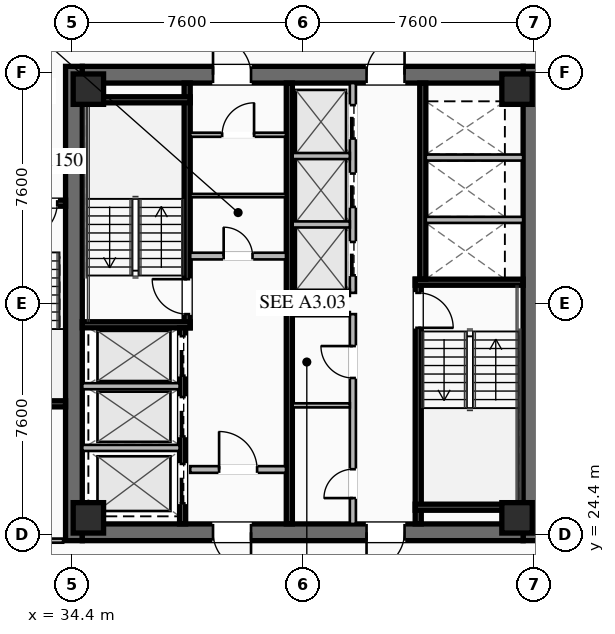
"""IFC4 building model, lengths in metres.
Left out: names, types, materials, properties, quantities, classifications, styles, units other than length and angle.
Written with IfcOpenShell. Run it as: python <this file> out.ifc"""

import sys

from ifc_helpers import new_model, si_unit, direction, frame, frame_2d, origin, origin_2d, place, context, subcontext, project, spatial, rectangle, hollow_rectangle, extrude, element, fill, save


model = new_model("IFC4")
c1 = context("Model", 3, precision=1e-05, world=origin(), true_north=direction((0.0, 1.0)))
c2 = subcontext(c1, "Body", "Model", "MODEL_VIEW")
j1 = project(units=[si_unit("LENGTHUNIT", "METRE"), si_unit("PLANEANGLEUNIT", "RADIAN")], contexts=[c1])
p1 = place(None, origin())
s1 = spatial("IfcSite", under=j1, at=p1, CompositionType="ELEMENT")
p2 = place(p1, origin())
s2 = spatial("IfcBuilding", under=s1, at=p2, CompositionType="ELEMENT")
p3 = place(p2, frame((0.0, 0.0, 142.8)))
s3 = spatial("IfcBuildingStorey", under=s2, at=p3, CompositionType="ELEMENT", Elevation=142.8)
for number, where, z_axis, x_axis in (
    (1, (34.475, 24.2, 0.0), (0.0, 0.0, 1.0), (0.0, 1.0, 0.0)),
    (2, (49.525, 39.8, 0.0), (0.0, 0.0, 1.0), (0.0, -1.0, 0.0)),
):
    element("IfcWall", number, at=place(p3, frame(where, z_axis=z_axis, x_axis=x_axis)), inside=s3, PredefinedType="SHEAR", context=c2, shape_type="SweptSolid", body=[
        extrude(rectangle(XDim=15.6, YDim=0.55, at=frame_2d((7.8, 0.0))), origin(), (0.0, 0.0, 1.0), 3.55),
    ])
p4 = place(p3, frame((49.25, 24.475, 0.0), z_axis=(0.0, 0.0, 1.0), x_axis=(-1.0, 0.0, 0.0)))
e3 = element("IfcWall", 3, at=p4, inside=s3, PredefinedType="SHEAR", context=c2, shape_type="SweptSolid", body=[
    extrude(rectangle(XDim=14.5, YDim=0.55, at=frame_2d((7.25, 0.0))), origin(), (0.0, 0.0, 1.0), 3.55),
])
p5 = place(p4, frame((8.95, 0.0, 0.0)))
e4 = element("IfcOpeningElement", 4, at=p5, cuts=e3, PredefinedType="OPENING", context=c2, shape_type="SweptSolid", body=[
    extrude(rectangle(XDim=1.25, YDim=2.25, at=frame_2d((0.625, 1.125))), frame((0.0, 0.285, 0.0), z_axis=(0.0, -1.0, 0.0), x_axis=(1.0, 0.0, 0.0)), (0.0, 0.0, 1.0), 0.57),
])
p6 = place(p4, frame((3.9, 0.0, 0.0)))
e5 = element("IfcOpeningElement", 5, at=p6, cuts=e3, PredefinedType="OPENING", context=c2, shape_type="SweptSolid", body=[
    extrude(rectangle(XDim=1.25, YDim=2.25, at=frame_2d((0.625, 1.125))), frame((0.0, 0.285, 0.0), z_axis=(0.0, -1.0, 0.0), x_axis=(1.0, 0.0, 0.0)), (0.0, 0.0, 1.0), 0.57),
])
p7 = place(p3, frame((34.75, 39.525, 0.0), z_axis=(0.0, 0.0, 1.0), x_axis=(1.0, 0.0, 0.0)))
e6 = element("IfcWall", 6, at=p7, inside=s3, PredefinedType="SHEAR", context=c2, shape_type="SweptSolid", body=[
    extrude(rectangle(XDim=14.5, YDim=0.55, at=frame_2d((7.25, 0.0))), origin(), (0.0, 0.0, 1.0), 3.55),
])
p8 = place(p7, frame((4.3, 0.0, 0.0)))
e7 = element("IfcOpeningElement", 7, at=p8, cuts=e6, PredefinedType="OPENING", context=c2, shape_type="SweptSolid", body=[
    extrude(rectangle(XDim=1.25, YDim=2.25, at=frame_2d((0.625, 1.125))), frame((0.0, 0.285, 0.0), z_axis=(0.0, -1.0, 0.0), x_axis=(1.0, 0.0, 0.0)), (0.0, 0.0, 1.0), 0.57),
])
p9 = place(p7, frame((9.35, 0.0, 0.0)))
e8 = element("IfcOpeningElement", 8, at=p9, cuts=e6, PredefinedType="OPENING", context=c2, shape_type="SweptSolid", body=[
    extrude(rectangle(XDim=1.25, YDim=2.25, at=frame_2d((0.625, 1.125))), frame((0.0, 0.285, 0.0), z_axis=(0.0, -1.0, 0.0), x_axis=(1.0, 0.0, 0.0)), (0.0, 0.0, 1.0), 0.57),
])
for number, where, z_axis, x_axis in (
    (9, (34.95, 24.95, 0.0), (0.0, 0.0, 1.0), (1.0, 0.0, 0.0)),
    (10, (49.05, 24.95, 0.0), (0.0, 0.0, 1.0), (1.0, 0.0, 0.0)),
    (11, (49.05, 39.05, 0.0), (0.0, 0.0, 1.0), (1.0, 0.0, 0.0)),
    (12, (34.95, 39.05, 0.0), (0.0, 0.0, 1.0), (1.0, 0.0, 0.0)),
):
    element("IfcColumn", number, at=place(p3, frame(where, z_axis=z_axis, x_axis=x_axis)), inside=s3, PredefinedType="COLUMN", context=c2, shape_type="SweptSolid", body=[
        extrude(hollow_rectangle(XDim=1.0, YDim=1.0, WallThickness=0.04, at=origin_2d()), origin(), (0.0, 0.0, 1.0), 3.37),
    ])
p10 = place(p3, frame((38.2, 31.2, 0.0), z_axis=(0.0, 0.0, 1.0), x_axis=(0.0, 1.0, 0.0)))
e13 = element("IfcWall", 13, at=p10, inside=s3, PredefinedType="SHEAR", context=c2, shape_type="SweptSolid", body=[
    extrude(rectangle(XDim=8.05, YDim=0.2, at=frame_2d((4.025, 0.0))), origin(), (0.0, 0.0, 1.0), 3.37),
])
p11 = place(p10, frame((0.45, 0.0, 0.0)))
e14 = element("IfcOpeningElement", 14, at=p11, cuts=e13, PredefinedType="OPENING", context=c2, shape_type="SweptSolid", body=[
    extrude(rectangle(XDim=1.15, YDim=2.2, at=frame_2d((0.575, 1.1))), frame((0.0, 0.11, 0.0), z_axis=(0.0, -1.0, 0.0), x_axis=(1.0, 0.0, 0.0)), (0.0, 0.0, 1.0), 0.22),
])
for number, where, z_axis, x_axis in (
    (15, (34.75, 31.3, 0.0), (0.0, 0.0, 1.0), (1.0, 0.0, 0.0)),
    (16, (34.75, 38.7, 0.0), (0.0, 0.0, 1.0), (1.0, 0.0, 0.0)),
):
    element("IfcWall", number, at=place(p3, frame(where, z_axis=z_axis, x_axis=x_axis)), inside=s3, PredefinedType="SHEAR", context=c2, shape_type="SweptSolid", body=[
        extrude(rectangle(XDim=3.55, YDim=0.2, at=frame_2d((1.775, 0.0))), origin(), (0.0, 0.0, 1.0), 3.37),
    ])
p12 = place(p3, frame((45.8, 32.8, 0.0), z_axis=(0.0, 0.0, 1.0), x_axis=(0.0, -1.0, 0.0)))
e17 = element("IfcWall", 17, at=p12, inside=s3, PredefinedType="SHEAR", context=c2, shape_type="SweptSolid", body=[
    extrude(rectangle(XDim=8.05, YDim=0.2, at=frame_2d((4.025, 0.0))), origin(), (0.0, 0.0, 1.0), 3.37),
])
p13 = place(p12, frame((0.45, 0.0, 0.0)))
e18 = element("IfcOpeningElement", 18, at=p13, cuts=e17, PredefinedType="OPENING", context=c2, shape_type="SweptSolid", body=[
    extrude(rectangle(XDim=1.15, YDim=2.2, at=frame_2d((0.575, 1.1))), frame((0.0, 0.11, 0.0), z_axis=(0.0, -1.0, 0.0), x_axis=(1.0, 0.0, 0.0)), (0.0, 0.0, 1.0), 0.22),
])
for number, where, z_axis, x_axis in (
    (19, (45.7, 32.7, 0.0), (0.0, 0.0, 1.0), (1.0, 0.0, 0.0)),
    (20, (45.7, 25.3, 0.0), (0.0, 0.0, 1.0), (1.0, 0.0, 0.0)),
):
    element("IfcWall", number, at=place(p3, frame(where, z_axis=z_axis, x_axis=x_axis)), inside=s3, PredefinedType="SHEAR", context=c2, shape_type="SweptSolid", body=[
        extrude(rectangle(XDim=3.55, YDim=0.2, at=frame_2d((1.775, 0.0))), origin(), (0.0, 0.0, 1.0), 3.37),
    ])
p14 = place(p3, frame((41.56, 24.75, 0.0), z_axis=(0.0, 0.0, 1.0), x_axis=(0.0, 1.0, 0.0)))
e21 = element("IfcWall", 21, at=p14, inside=s3, PredefinedType="SHEAR", context=c2, shape_type="SweptSolid", body=[
    extrude(rectangle(XDim=14.5, YDim=0.2, at=frame_2d((7.25, 0.0))), origin(), (0.0, 0.0, 1.0), 3.37),
])
p15 = place(p3, frame((38.3, 33.56, 0.0), z_axis=(0.0, 0.0, 1.0), x_axis=(1.0, 0.0, 0.0)))
e22 = element("IfcWall", 22, at=p15, inside=s3, PredefinedType="SOLIDWALL", context=c2, shape_type="SweptSolid", body=[
    extrude(rectangle(XDim=3.15, YDim=0.22, at=frame_2d((1.575, 0.0))), origin(), (0.0, 0.0, 1.0), 2.723),
])
p16 = place(p15, frame((1.1, 0.0, 0.0)))
e23 = element("IfcOpeningElement", 23, at=p16, cuts=e22, PredefinedType="OPENING", context=c2, shape_type="SweptSolid", body=[
    extrude(rectangle(XDim=0.95, YDim=2.05, at=frame_2d((0.475, 1.025))), frame((0.0, 0.12, 0.0), z_axis=(0.0, -1.0, 0.0), x_axis=(1.0, 0.0, 0.0)), (0.0, 0.0, 1.0), 0.24),
])
p17 = place(p3, frame((38.3, 26.54, 0.0), z_axis=(0.0, 0.0, 1.0), x_axis=(1.0, 0.0, 0.0)))
e24 = element("IfcWall", 24, at=p17, inside=s3, PredefinedType="SOLIDWALL", context=c2, shape_type="SweptSolid", body=[
    extrude(rectangle(XDim=3.15, YDim=0.22, at=frame_2d((1.575, 0.0))), origin(), (0.0, 0.0, 1.0), 2.723),
])
p18 = place(p17, frame((0.95, 0.0, 0.0)))
e25 = element("IfcOpeningElement", 25, at=p18, cuts=e24, PredefinedType="OPENING", context=c2, shape_type="SweptSolid", body=[
    extrude(rectangle(XDim=1.25, YDim=2.25, at=frame_2d((0.625, 1.125))), frame((0.0, 0.12, 0.0), z_axis=(0.0, -1.0, 0.0), x_axis=(1.0, 0.0, 0.0)), (0.0, 0.0, 1.0), 0.24),
])
p19 = place(p3, frame((38.05, 24.75, 0.0), z_axis=(0.0, 0.0, 1.0), x_axis=(0.0, 1.0, 0.0)))
e26 = element("IfcWall", 26, at=p19, inside=s3, PredefinedType="SHEAR", context=c2, shape_type="SweptSolid", body=[
    extrude(rectangle(XDim=6.45, YDim=0.2, at=frame_2d((3.225, 0.0))), origin(), (0.0, 0.0, 1.0), 3.37),
])
p20 = place(p19, frame((4.875, 0.0, 0.0)))
e27 = element("IfcOpeningElement", 27, at=p20, cuts=e26, PredefinedType="OPENING", context=c2, shape_type="SweptSolid", body=[
    extrude(rectangle(XDim=1.3, YDim=2.25, at=frame_2d((0.65, 1.125))), frame((0.0, 0.11, 0.0), z_axis=(0.0, -1.0, 0.0), x_axis=(1.0, 0.0, 0.0)), (0.0, 0.0, 1.0), 0.22),
])
p21 = place(p19, frame((2.875, 0.0, 0.0)))
e28 = element("IfcOpeningElement", 28, at=p21, cuts=e26, PredefinedType="OPENING", context=c2, shape_type="SweptSolid", body=[
    extrude(rectangle(XDim=1.3, YDim=2.25, at=frame_2d((0.65, 1.125))), frame((0.0, 0.11, 0.0), z_axis=(0.0, -1.0, 0.0), x_axis=(1.0, 0.0, 0.0)), (0.0, 0.0, 1.0), 0.22),
])
p22 = place(p19, frame((0.675, 0.0, 0.0)))
e29 = element("IfcOpeningElement", 29, at=p22, cuts=e26, PredefinedType="OPENING", context=c2, shape_type="SweptSolid", body=[
    extrude(rectangle(XDim=1.3, YDim=2.25, at=frame_2d((0.65, 1.125))), frame((0.0, 0.11, 0.0), z_axis=(0.0, -1.0, 0.0), x_axis=(1.0, 0.0, 0.0)), (0.0, 0.0, 1.0), 0.22),
])
for number, where, z_axis, x_axis in (
    (30, (34.75, 27.25, 0.0), (0.0, 0.0, 1.0), (1.0, 0.0, 0.0)),
    (31, (34.75, 29.28, 0.0), (0.0, 0.0, 1.0), (1.0, 0.0, 0.0)),
):
    element("IfcWall", number, at=place(p3, frame(where, z_axis=z_axis, x_axis=x_axis)), inside=s3, PredefinedType="SOLIDWALL", context=c2, shape_type="SweptSolid", body=[
        extrude(rectangle(XDim=3.2, YDim=0.2, at=frame_2d((1.6, 0.0))), origin(), (0.0, 0.0, 1.0), 3.37),
    ])
p23 = place(p3, frame((45.95, 39.25, 0.0), z_axis=(0.0, 0.0, 1.0), x_axis=(0.0, -1.0, 0.0)))
e32 = element("IfcWall", 32, at=p23, inside=s3, PredefinedType="SHEAR", context=c2, shape_type="SweptSolid", body=[
    extrude(rectangle(XDim=6.45, YDim=0.2, at=frame_2d((3.225, 0.0))), origin(), (0.0, 0.0, 1.0), 3.37),
])
for number, where, z_axis, x_axis in (
    (33, (46.05, 34.75, 0.0), (0.0, 0.0, 1.0), (1.0, 0.0, 0.0)),
    (34, (46.05, 36.8, 0.0), (0.0, 0.0, 1.0), (1.0, 0.0, 0.0)),
):
    element("IfcWall", number, at=place(p3, frame(where, z_axis=z_axis, x_axis=x_axis)), inside=s3, PredefinedType="SOLIDWALL", context=c2, shape_type="SweptSolid", body=[
        extrude(rectangle(XDim=3.2, YDim=0.2, at=frame_2d((1.6, 0.0))), origin(), (0.0, 0.0, 1.0), 3.37),
    ])
p24 = place(p3, frame((38.3, 37.55, 0.0), z_axis=(0.0, 0.0, 1.0), x_axis=(1.0, 0.0, 0.0)))
e35 = element("IfcWall", 35, at=p24, inside=s3, PredefinedType="PARTITIONING", context=c2, shape_type="SweptSolid", body=[
    extrude(rectangle(XDim=3.15, YDim=0.135, at=frame_2d((1.575, 0.0))), origin(), (0.0, 0.0, 1.0), 2.723),
])
p25 = place(p24, frame((1.05, 0.0, 0.0)))
e36 = element("IfcOpeningElement", 36, at=p25, cuts=e35, PredefinedType="OPENING", context=c2, shape_type="SweptSolid", body=[
    extrude(rectangle(XDim=1.05, YDim=2.2, at=frame_2d((0.525, 1.1))), frame((0.0, 0.077, 0.0), z_axis=(0.0, -1.0, 0.0), x_axis=(1.0, 0.0, 0.0)), (0.0, 0.0, 1.0), 0.155),
])
p26 = place(p3, frame((38.3, 35.55, 0.0), z_axis=(0.0, 0.0, 1.0), x_axis=(1.0, 0.0, 0.0)))
e37 = element("IfcWall", 37, at=p26, inside=s3, PredefinedType="PARTITIONING", context=c2, shape_type="SweptSolid", body=[
    extrude(rectangle(XDim=3.15, YDim=0.11, at=frame_2d((1.575, 0.0))), origin(), (0.0, 0.0, 1.0), 2.723),
])
p27 = place(p3, frame((43.65, 24.75, 0.0), z_axis=(0.0, 0.0, 1.0), x_axis=(0.0, 1.0, 0.0)))
e38 = element("IfcWall", 38, at=p27, inside=s3, PredefinedType="SOLIDWALL", context=c2, shape_type="SweptSolid", body=[
    extrude(rectangle(XDim=6.9, YDim=0.2, at=frame_2d((3.45, 0.0))), origin(), (0.0, 0.0, 1.0), 2.723),
])
p28 = place(p27, frame((0.85, 0.0, 0.0)))
e39 = element("IfcOpeningElement", 39, at=p28, cuts=e38, PredefinedType="OPENING", context=c2, shape_type="SweptSolid", body=[
    extrude(rectangle(XDim=0.95, YDim=2.05, at=frame_2d((0.475, 1.025))), frame((0.0, 0.11, 0.0), z_axis=(0.0, -1.0, 0.0), x_axis=(1.0, 0.0, 0.0)), (0.0, 0.0, 1.0), 0.22),
])
p29 = place(p27, frame((4.8, 0.0, 0.0)))
e40 = element("IfcOpeningElement", 40, at=p29, cuts=e38, PredefinedType="OPENING", context=c2, shape_type="SweptSolid", body=[
    extrude(rectangle(XDim=1.05, YDim=2.2, at=frame_2d((0.525, 1.1))), frame((0.0, 0.11, 0.0), z_axis=(0.0, -1.0, 0.0), x_axis=(1.0, 0.0, 0.0)), (0.0, 0.0, 1.0), 0.22),
])
for number, where, z_axis, x_axis in (
    (41, (41.67, 31.65, 0.0), (0.0, 0.0, 1.0), (1.0, 0.0, 0.0)),
    (42, (41.67, 28.65, 0.0), (0.0, 0.0, 1.0), (1.0, 0.0, 0.0)),
):
    element("IfcWall", number, at=place(p3, frame(where, z_axis=z_axis, x_axis=x_axis)), inside=s3, PredefinedType="PARTITIONING", context=c2, shape_type="SweptSolid", body=[
        extrude(rectangle(XDim=1.88, YDim=0.135, at=frame_2d((0.94, 0.0))), origin(), (0.0, 0.0, 1.0), 2.723),
    ])
p30 = place(p3, frame((43.65, 32.35, 0.0), z_axis=(0.0, 0.0, 1.0), x_axis=(0.0, 1.0, 0.0)))
e43 = element("IfcWall", 43, at=p30, inside=s3, PredefinedType="SOLIDWALL", context=c2, shape_type="SweptSolid", body=[
    extrude(rectangle(XDim=6.9, YDim=0.2, at=frame_2d((3.45, 0.0))), origin(), (0.0, 0.0, 1.0), 3.37),
])
p31 = place(p30, frame((0.575, 0.0, 0.0)))
e44 = element("IfcOpeningElement", 44, at=p31, cuts=e43, PredefinedType="OPENING", context=c2, shape_type="SweptSolid", body=[
    extrude(rectangle(XDim=1.1, YDim=2.2, at=frame_2d((0.55, 1.1))), frame((0.0, 0.11, 0.0), z_axis=(0.0, -1.0, 0.0), x_axis=(1.0, 0.0, 0.0)), (0.0, 0.0, 1.0), 0.22),
])
p32 = place(p30, frame((2.825, 0.0, 0.0)))
e45 = element("IfcOpeningElement", 45, at=p32, cuts=e43, PredefinedType="OPENING", context=c2, shape_type="SweptSolid", body=[
    extrude(rectangle(XDim=1.1, YDim=2.2, at=frame_2d((0.55, 1.1))), frame((0.0, 0.11, 0.0), z_axis=(0.0, -1.0, 0.0), x_axis=(1.0, 0.0, 0.0)), (0.0, 0.0, 1.0), 0.22),
])
p33 = place(p30, frame((5.075, 0.0, 0.0)))
e46 = element("IfcOpeningElement", 46, at=p33, cuts=e43, PredefinedType="OPENING", context=c2, shape_type="SweptSolid", body=[
    extrude(rectangle(XDim=1.1, YDim=2.2, at=frame_2d((0.55, 1.1))), frame((0.0, 0.11, 0.0), z_axis=(0.0, -1.0, 0.0), x_axis=(1.0, 0.0, 0.0)), (0.0, 0.0, 1.0), 0.22),
])
for number, where, z_axis, x_axis in (
    (47, (41.67, 32.35, 0.0), (0.0, 0.0, 1.0), (1.0, 0.0, 0.0)),
    (48, (41.67, 34.6, 0.0), (0.0, 0.0, 1.0), (1.0, 0.0, 0.0)),
    (49, (41.67, 36.85, 0.0), (0.0, 0.0, 1.0), (1.0, 0.0, 0.0)),
):
    element("IfcWall", number, at=place(p3, frame(where, z_axis=z_axis, x_axis=x_axis)), inside=s3, PredefinedType="SOLIDWALL", context=c2, shape_type="SweptSolid", body=[
        extrude(rectangle(XDim=1.88, YDim=0.2, at=frame_2d((0.94, 0.0))), origin(), (0.0, 0.0, 1.0), 3.37),
    ])
p34 = place(p3, frame((34.2, 35.3, 0.0), z_axis=(0.0, 0.0, 1.0), x_axis=(-1.0, 0.0, 0.0)))
e50 = element("IfcWall", 50, at=p34, inside=s3, PredefinedType="SHEAR", context=c2, shape_type="SweptSolid", body=[
    extrude(rectangle(XDim=3.4, YDim=0.2, at=frame_2d((1.7, 0.0))), origin(), (0.0, 0.0, 1.0), 3.37),
])
p35 = place(p34, frame((0.275, 0.0, 0.0)))
e51 = element("IfcOpeningElement", 51, at=p35, cuts=e50, PredefinedType="OPENING", context=c2, shape_type="SweptSolid", body=[
    extrude(rectangle(XDim=1.15, YDim=2.2, at=frame_2d((0.575, 1.1))), frame((0.0, 0.11, 0.0), z_axis=(0.0, -1.0, 0.0), x_axis=(1.0, 0.0, 0.0)), (0.0, 0.0, 1.0), 0.22),
])
p36 = place(p3, frame((30.8, 28.7, 0.0), z_axis=(0.0, 0.0, 1.0), x_axis=(1.0, 0.0, 0.0)))
e52 = element("IfcWall", 52, at=p36, inside=s3, PredefinedType="SHEAR", context=c2, shape_type="SweptSolid", body=[
    extrude(rectangle(XDim=3.4, YDim=0.2, at=frame_2d((1.7, 0.0))), origin(), (0.0, 0.0, 1.0), 3.37),
])
p37 = place(p3, frame((22.72, 24.2, 0.0), z_axis=(0.0, 0.0, 1.0), x_axis=(1.0, 0.0, 0.0)))
e53 = element("IfcWall", 53, at=p37, inside=s3, PredefinedType="PARTITIONING", context=c2, shape_type="SweptSolid", body=[
    extrude(rectangle(XDim=11.4, YDim=0.135, at=frame_2d((5.7, 0.0))), origin(), (0.0, 0.0, 1.0), 2.723),
])
p38 = place(p37, frame((8.405, 0.0, 0.0)))
e54 = element("IfcOpeningElement", 54, at=p38, cuts=e53, PredefinedType="OPENING", context=c2, shape_type="SweptSolid", body=[
    extrude(rectangle(XDim=0.95, YDim=2.05, at=frame_2d((0.475, 1.025))), frame((0.0, 0.077, 0.0), z_axis=(0.0, -1.0, 0.0), x_axis=(1.0, 0.0, 0.0)), (0.0, 0.0, 1.0), 0.155),
])
p39 = place(p8, origin())
e55 = element("IfcDoor", 55, at=p39, inside=s3, OperationType="SINGLE_SWING_LEFT", PredefinedType="DOOR", context=c2, shape_type="SweptSolid", body=[
    extrude(rectangle(XDim=1.25, YDim=2.25, at=frame_2d((0.625, 1.125))), frame((0.0, 0.025, 0.0), z_axis=(0.0, -1.0, 0.0), x_axis=(1.0, 0.0, 0.0)), (0.0, 0.0, 1.0), 0.05),
])
fill(e7, e55)
p40 = place(p9, origin())
e56 = element("IfcDoor", 56, at=p40, inside=s3, OperationType="SINGLE_SWING_RIGHT", PredefinedType="DOOR", context=c2, shape_type="SweptSolid", body=[
    extrude(rectangle(XDim=1.25, YDim=2.25, at=frame_2d((0.625, 1.125))), frame((0.0, 0.025, 0.0), z_axis=(0.0, -1.0, 0.0), x_axis=(1.0, 0.0, 0.0)), (0.0, 0.0, 1.0), 0.05),
])
fill(e8, e56)
p41 = place(p5, origin())
e57 = element("IfcDoor", 57, at=p41, inside=s3, OperationType="SINGLE_SWING_LEFT", PredefinedType="DOOR", context=c2, shape_type="SweptSolid", body=[
    extrude(rectangle(XDim=1.25, YDim=2.25, at=frame_2d((0.625, 1.125))), frame((0.0, 0.025, 0.0), z_axis=(0.0, -1.0, 0.0), x_axis=(1.0, 0.0, 0.0)), (0.0, 0.0, 1.0), 0.05),
])
fill(e4, e57)
p42 = place(p6, origin())
e58 = element("IfcDoor", 58, at=p42, inside=s3, OperationType="SINGLE_SWING_RIGHT", PredefinedType="DOOR", context=c2, shape_type="SweptSolid", body=[
    extrude(rectangle(XDim=1.25, YDim=2.25, at=frame_2d((0.625, 1.125))), frame((0.0, 0.025, 0.0), z_axis=(0.0, -1.0, 0.0), x_axis=(1.0, 0.0, 0.0)), (0.0, 0.0, 1.0), 0.05),
])
fill(e5, e58)
p43 = place(p11, origin())
e59 = element("IfcDoor", 59, at=p43, inside=s3, OperationType="SINGLE_SWING_RIGHT", PredefinedType="DOOR", context=c2, shape_type="SweptSolid", body=[
    extrude(rectangle(XDim=1.15, YDim=2.2, at=frame_2d((0.575, 1.1))), frame((0.0, 0.025, 0.0), z_axis=(0.0, -1.0, 0.0), x_axis=(1.0, 0.0, 0.0)), (0.0, 0.0, 1.0), 0.05),
])
fill(e14, e59)
p44 = place(p13, origin())
e60 = element("IfcDoor", 60, at=p44, inside=s3, OperationType="SINGLE_SWING_RIGHT", PredefinedType="DOOR", context=c2, shape_type="SweptSolid", body=[
    extrude(rectangle(XDim=1.15, YDim=2.2, at=frame_2d((0.575, 1.1))), frame((0.0, 0.025, 0.0), z_axis=(0.0, -1.0, 0.0), x_axis=(1.0, 0.0, 0.0)), (0.0, 0.0, 1.0), 0.05),
])
fill(e18, e60)
p45 = place(p18, origin())
e61 = element("IfcDoor", 61, at=p45, inside=s3, OperationType="SINGLE_SWING_LEFT", PredefinedType="DOOR", context=c2, shape_type="SweptSolid", body=[
    extrude(rectangle(XDim=1.25, YDim=2.25, at=frame_2d((0.625, 1.125))), frame((0.0, 0.025, 0.0), z_axis=(0.0, -1.0, 0.0), x_axis=(1.0, 0.0, 0.0)), (0.0, 0.0, 1.0), 0.05),
])
fill(e25, e61)
p46 = place(p25, origin())
e62 = element("IfcDoor", 62, at=p46, inside=s3, OperationType="SINGLE_SWING_RIGHT", PredefinedType="DOOR", context=c2, shape_type="SweptSolid", body=[
    extrude(rectangle(XDim=1.05, YDim=2.2, at=frame_2d((0.525, 1.1))), frame((0.0, 0.025, 0.0), z_axis=(0.0, -1.0, 0.0), x_axis=(1.0, 0.0, 0.0)), (0.0, 0.0, 1.0), 0.05),
])
fill(e36, e62)
p47 = place(p16, origin())
e63 = element("IfcDoor", 63, at=p47, inside=s3, OperationType="SINGLE_SWING_LEFT", PredefinedType="DOOR", context=c2, shape_type="SweptSolid", body=[
    extrude(rectangle(XDim=0.95, YDim=2.05, at=frame_2d((0.475, 1.025))), frame((0.0, 0.025, 0.0), z_axis=(0.0, -1.0, 0.0), x_axis=(1.0, 0.0, 0.0)), (0.0, 0.0, 1.0), 0.05),
])
fill(e23, e63)
p48 = place(p28, origin())
e64 = element("IfcDoor", 64, at=p48, inside=s3, OperationType="SINGLE_SWING_LEFT", PredefinedType="DOOR", context=c2, shape_type="SweptSolid", body=[
    extrude(rectangle(XDim=0.95, YDim=2.05, at=frame_2d((0.475, 1.025))), frame((0.0, 0.025, 0.0), z_axis=(0.0, -1.0, 0.0), x_axis=(1.0, 0.0, 0.0)), (0.0, 0.0, 1.0), 0.05),
])
fill(e39, e64)
p49 = place(p29, origin())
e65 = element("IfcDoor", 65, at=p49, inside=s3, OperationType="SINGLE_SWING_RIGHT", PredefinedType="DOOR", context=c2, shape_type="SweptSolid", body=[
    extrude(rectangle(XDim=1.05, YDim=2.2, at=frame_2d((0.525, 1.1))), frame((0.0, 0.025, 0.0), z_axis=(0.0, -1.0, 0.0), x_axis=(1.0, 0.0, 0.0)), (0.0, 0.0, 1.0), 0.05),
])
fill(e40, e65)
p50 = place(p35, origin())
e66 = element("IfcDoor", 66, at=p50, inside=s3, OperationType="SINGLE_SWING_RIGHT", PredefinedType="DOOR", context=c2, shape_type="SweptSolid", body=[
    extrude(rectangle(XDim=1.15, YDim=2.2, at=frame_2d((0.575, 1.1))), frame((0.0, 0.025, 0.0), z_axis=(0.0, -1.0, 0.0), x_axis=(1.0, 0.0, 0.0)), (0.0, 0.0, 1.0), 0.05),
])
fill(e51, e66)
p51 = place(p20, origin())
e67 = element("IfcDoor", 67, at=p51, inside=s3, OperationType="SLIDING_TO_LEFT", PredefinedType="DOOR", context=c2, shape_type="SweptSolid", body=[
    extrude(rectangle(XDim=1.3, YDim=2.25, at=frame_2d((0.65, 1.125))), frame((0.0, 0.025, 0.0), z_axis=(0.0, -1.0, 0.0), x_axis=(1.0, 0.0, 0.0)), (0.0, 0.0, 1.0), 0.05),
])
fill(e27, e67)
p52 = place(p21, origin())
e68 = element("IfcDoor", 68, at=p52, inside=s3, OperationType="SLIDING_TO_LEFT", PredefinedType="DOOR", context=c2, shape_type="SweptSolid", body=[
    extrude(rectangle(XDim=1.3, YDim=2.25, at=frame_2d((0.65, 1.125))), frame((0.0, 0.025, 0.0), z_axis=(0.0, -1.0, 0.0), x_axis=(1.0, 0.0, 0.0)), (0.0, 0.0, 1.0), 0.05),
])
fill(e28, e68)
p53 = place(p22, origin())
e69 = element("IfcDoor", 69, at=p53, inside=s3, OperationType="SLIDING_TO_LEFT", PredefinedType="DOOR", context=c2, shape_type="SweptSolid", body=[
    extrude(rectangle(XDim=1.3, YDim=2.25, at=frame_2d((0.65, 1.125))), frame((0.0, 0.025, 0.0), z_axis=(0.0, -1.0, 0.0), x_axis=(1.0, 0.0, 0.0)), (0.0, 0.0, 1.0), 0.05),
])
fill(e29, e69)
p54 = place(p31, origin())
e70 = element("IfcDoor", 70, at=p54, inside=s3, OperationType="SLIDING_TO_LEFT", PredefinedType="DOOR", context=c2, shape_type="SweptSolid", body=[
    extrude(rectangle(XDim=1.1, YDim=2.2, at=frame_2d((0.55, 1.1))), frame((0.0, 0.025, 0.0), z_axis=(0.0, -1.0, 0.0), x_axis=(1.0, 0.0, 0.0)), (0.0, 0.0, 1.0), 0.05),
])
fill(e44, e70)
p55 = place(p32, origin())
e71 = element("IfcDoor", 71, at=p55, inside=s3, OperationType="SLIDING_TO_LEFT", PredefinedType="DOOR", context=c2, shape_type="SweptSolid", body=[
    extrude(rectangle(XDim=1.1, YDim=2.2, at=frame_2d((0.55, 1.1))), frame((0.0, 0.025, 0.0), z_axis=(0.0, -1.0, 0.0), x_axis=(1.0, 0.0, 0.0)), (0.0, 0.0, 1.0), 0.05),
])
fill(e45, e71)
p56 = place(p33, origin())
e72 = element("IfcDoor", 72, at=p56, inside=s3, OperationType="SLIDING_TO_LEFT", PredefinedType="DOOR", context=c2, shape_type="SweptSolid", body=[
    extrude(rectangle(XDim=1.1, YDim=2.2, at=frame_2d((0.55, 1.1))), frame((0.0, 0.025, 0.0), z_axis=(0.0, -1.0, 0.0), x_axis=(1.0, 0.0, 0.0)), (0.0, 0.0, 1.0), 0.05),
])
fill(e46, e72)
save(model, sys.argv[1])
